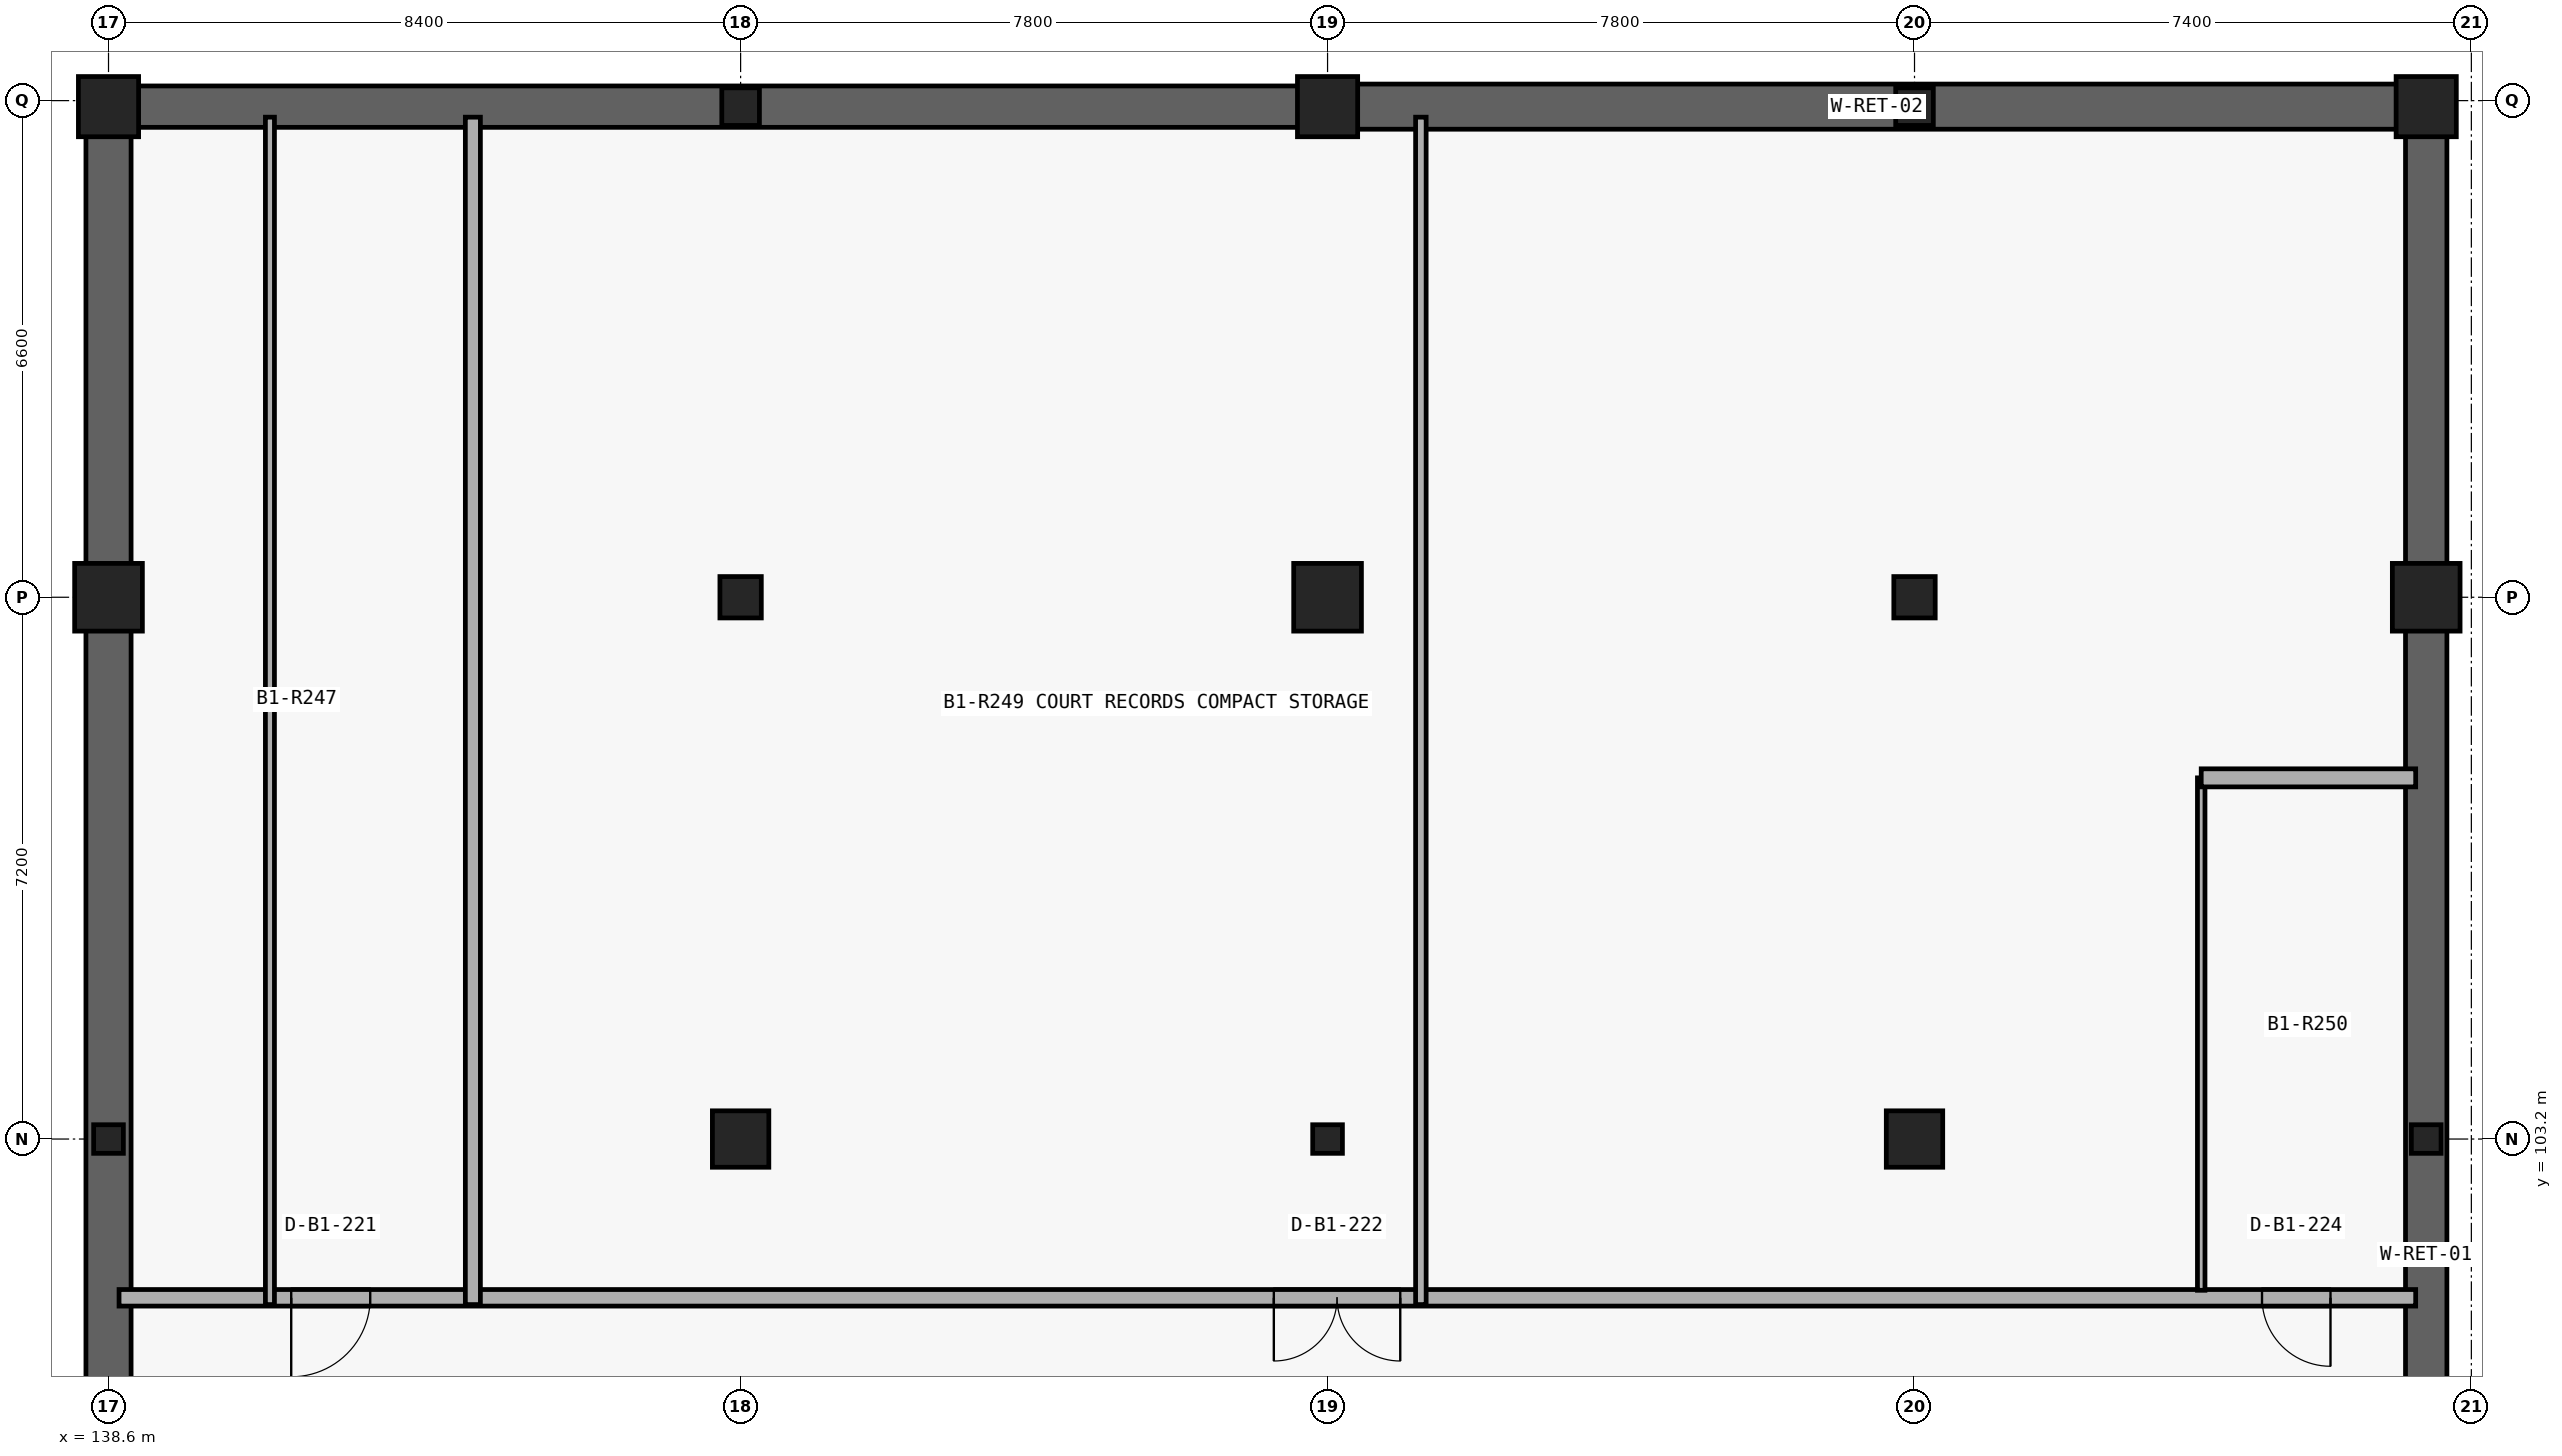
"""IFC4 building model, lengths in metres.
Left out: names, types, materials, properties, quantities, classifications, styles, units other than length and angle.
Written with IfcOpenShell. Run it as: python <this file> out.ifc"""

import sys

from ifc_helpers import new_model, si_unit, direction, frame, frame_2d, origin_with_axes, origin_2d_with_axis, place, context, subcontext, project, spatial, rectangle, i_section, extrude, element, fill, save


model = new_model("IFC4")
c1 = context("Model", 3, precision=1e-05, world=origin_with_axes(), true_north=direction((0.0, 1.0)))
c2 = subcontext(c1, "Body", "Model", "MODEL_VIEW")
j1 = project(units=[si_unit("LENGTHUNIT", "METRE"), si_unit("PLANEANGLEUNIT", "RADIAN")], contexts=[c1])
p1 = place(None, origin_with_axes())
s1 = spatial("IfcSite", under=j1, at=p1, CompositionType="ELEMENT")
p2 = place(p1, origin_with_axes())
s2 = spatial("IfcBuilding", under=s1, at=p2, CompositionType="ELEMENT")
p3 = place(p2, frame((0.0, 0.0, -4.8), z_axis=(0.0, 0.0, 1.0), x_axis=(1.0, 0.0, 0.0)))
s3 = spatial("IfcBuildingStorey", under=s2, at=p3, CompositionType="ELEMENT", Elevation=-4.8)
p4 = place(None, frame((169.4, 86.68, -5.35), z_axis=(0.0, 0.0, 1.0), x_axis=(0.0, 1.0, 0.0)))
e1 = element("IfcWall", 1, at=p4, inside=s3, PredefinedType="USERDEFINED", context=c2, shape_type="SweptSolid", body=[
    extrude(rectangle(XDim=29.96, YDim=0.55, at=frame_2d((14.98, 0.0), x_axis=(1.0, 0.0))), origin_with_axes(), (0.0, 0.0, 1.0), 5.01),
])
p5 = place(None, frame((169.4, 116.92, -5.35), z_axis=(0.0, 0.0, 1.0), x_axis=(-1.0, 0.0, 0.0)))
e2 = element("IfcWall", 2, at=p5, inside=s3, PredefinedType="USERDEFINED", context=c2, shape_type="SweptSolid", body=[
    extrude(rectangle(XDim=14.6, YDim=0.6, at=frame_2d((7.3, 0.0), x_axis=(1.0, 0.0))), origin_with_axes(), (0.0, 0.0, 1.0), 5.01),
])
p6 = place(None, frame((154.8, 116.92, -5.35), z_axis=(0.0, 0.0, 1.0), x_axis=(-1.0, 0.0, 0.0)))
e3 = element("IfcWall", 3, at=p6, inside=s3, PredefinedType="USERDEFINED", context=c2, shape_type="SweptSolid", body=[
    extrude(rectangle(XDim=16.2, YDim=0.55, at=frame_2d((8.1, 0.0), x_axis=(1.0, 0.0))), origin_with_axes(), (0.0, 0.0, 1.0), 5.01),
])
p7 = place(None, frame((138.6, 116.64, -5.35), z_axis=(0.0, 0.0, 1.0), x_axis=(0.0, -1.0, 0.0)))
e4 = element("IfcWall", 4, at=p7, inside=s3, PredefinedType="USERDEFINED", context=c2, shape_type="SweptSolid", body=[
    extrude(rectangle(XDim=29.96, YDim=0.6, at=frame_2d((14.98, 0.0), x_axis=(1.0, 0.0))), origin_with_axes(), (0.0, 0.0, 1.0), 5.01),
])
p8 = place(None, frame((138.74, 101.09, -4.8), z_axis=(0.0, 0.0, 1.0), x_axis=(1.0, 0.0, 0.0)))
e5 = element("IfcWall", 5, at=p8, inside=s3, PredefinedType="PARTITIONING", context=c2, shape_type="SweptSolid", body=[
    extrude(rectangle(XDim=30.52, YDim=0.22, at=frame_2d((15.26, 0.0), x_axis=(1.0, 0.0))), origin_with_axes(), (0.0, 0.0, 1.0), 4.44),
])
p9 = place(None, frame((141.553, 101.09, -4.8), z_axis=(0.0, 0.0, 1.0), x_axis=(1.0, 0.0, 0.0)))
e6 = element("IfcOpeningElement", 6, at=p9, cuts=e5, PredefinedType="OPENING", context=c2, shape_type="SweptSolid", body=[
    extrude(rectangle(XDim=1.05, YDim=2.15, at=frame_2d((0.0, 1.075), x_axis=(1.0, 0.0))), frame((0.0, 0.12, 0.0), z_axis=(0.0, -1.0, 0.0), x_axis=(1.0, 0.0, 0.0)), (0.0, 0.0, 1.0), 0.24),
])
p10 = place(None, frame((154.926, 101.09, -4.8), z_axis=(0.0, 0.0, 1.0), x_axis=(1.0, 0.0, 0.0)))
e7 = element("IfcOpeningElement", 7, at=p10, cuts=e5, PredefinedType="OPENING", context=c2, shape_type="SweptSolid", body=[
    extrude(rectangle(XDim=1.68, YDim=2.22, at=frame_2d((0.0, 1.11), x_axis=(1.0, 0.0))), frame((0.0, 0.12, 0.0), z_axis=(0.0, -1.0, 0.0), x_axis=(1.0, 0.0, 0.0)), (0.0, 0.0, 1.0), 0.24),
])
p11 = place(None, frame((167.673, 101.09, -4.8), z_axis=(0.0, 0.0, 1.0), x_axis=(1.0, 0.0, 0.0)))
e8 = element("IfcOpeningElement", 8, at=p11, cuts=e5, PredefinedType="OPENING", context=c2, shape_type="SweptSolid", body=[
    extrude(rectangle(XDim=0.91, YDim=2.12, at=frame_2d((0.0, 1.06), x_axis=(1.0, 0.0))), frame((0.0, 0.12, 0.0), z_axis=(0.0, -1.0, 0.0), x_axis=(1.0, 0.0, 0.0)), (0.0, 0.0, 1.0), 0.24),
])
p12 = place(None, frame((166.41, 101.19, -4.8), z_axis=(0.0, 0.0, 1.0), x_axis=(0.0, 1.0, 0.0)))
e9 = element("IfcWall", 9, at=p12, inside=s3, PredefinedType="PARTITIONING", context=c2, shape_type="SweptSolid", body=[
    extrude(rectangle(XDim=6.81, YDim=0.1, at=frame_2d((3.405, 0.0), x_axis=(1.0, 0.0))), origin_with_axes(), (0.0, 0.0, 1.0), 4.44),
])
p13 = place(None, frame((166.41, 108.0, -4.8), z_axis=(0.0, 0.0, 1.0), x_axis=(1.0, 0.0, 0.0)))
e10 = element("IfcWall", 10, at=p13, inside=s3, PredefinedType="PLUMBINGWALL", context=c2, shape_type="SweptSolid", body=[
    extrude(rectangle(XDim=2.85, YDim=0.24, at=frame_2d((1.425, 0.0), x_axis=(1.0, 0.0))), origin_with_axes(), (0.0, 0.0, 1.0), 4.152),
])
p14 = place(None, frame((140.745, 101.0, -4.8), z_axis=(0.0, 0.0, 1.0), x_axis=(0.0, 1.0, 0.0)))
e11 = element("IfcWall", 11, at=p14, inside=s3, PredefinedType="PARTITIONING", context=c2, shape_type="SweptSolid", body=[
    extrude(rectangle(XDim=15.78, YDim=0.12, at=frame_2d((7.89, 0.0), x_axis=(1.0, 0.0))), origin_with_axes(), (0.0, 0.0, 1.0), 4.44),
])
p15 = place(None, frame((143.442, 101.0, -4.8), z_axis=(0.0, 0.0, 1.0), x_axis=(0.0, 1.0, 0.0)))
e12 = element("IfcWall", 12, at=p15, inside=s3, PredefinedType="PARTITIONING", context=c2, shape_type="SweptSolid", body=[
    extrude(rectangle(XDim=15.78, YDim=0.2, at=frame_2d((7.89, 0.0), x_axis=(1.0, 0.0))), origin_with_axes(), (0.0, 0.0, 1.0), 4.44),
])
p16 = place(None, frame((156.04, 101.0, -4.8), z_axis=(0.0, 0.0, 1.0), x_axis=(0.0, 1.0, 0.0)))
e13 = element("IfcWall", 13, at=p16, inside=s3, PredefinedType="PARTITIONING", context=c2, shape_type="SweptSolid", body=[
    extrude(rectangle(XDim=15.78, YDim=0.14, at=frame_2d((7.89, 0.0), x_axis=(1.0, 0.0))), origin_with_axes(), (0.0, 0.0, 1.0), 4.44),
])
p17 = place(None, frame((138.6, 103.2, -5.35), z_axis=(0.0, 0.0, 1.0), x_axis=(1.0, 0.0, 0.0)))
e14 = element("IfcColumn", 14, at=p17, inside=s3, PredefinedType="COLUMN", context=c2, shape_type="SweptSolid", body=[
    extrude(i_section(OverallWidth=0.395, OverallDepth=0.38, WebThickness=0.019, FlangeThickness=0.03, at=origin_2d_with_axis()), origin_with_axes(), (0.0, 0.0, 1.0), 5.35),
])
p18 = place(None, frame((138.6, 110.4, -5.35), z_axis=(0.0, 0.0, 1.0), x_axis=(1.0, 0.0, 0.0)))
e15 = element("IfcColumn", 15, at=p18, inside=s3, PredefinedType="COLUMN", context=c2, shape_type="SweptSolid", body=[
    extrude(rectangle(XDim=0.9, YDim=0.9, at=origin_2d_with_axis()), origin_with_axes(), (0.0, 0.0, 1.0), 5.35),
])
p19 = place(None, frame((138.6, 116.92, -5.35), z_axis=(0.0, 0.0, 1.0), x_axis=(1.0, 0.0, 0.0)))
e16 = element("IfcColumn", 16, at=p19, inside=s3, PredefinedType="COLUMN", context=c2, shape_type="SweptSolid", body=[
    extrude(rectangle(XDim=0.8, YDim=0.8, at=origin_2d_with_axis()), origin_with_axes(), (0.0, 0.0, 1.0), 5.35),
])
p20 = place(None, frame((147.0, 103.2, -5.35), z_axis=(0.0, 0.0, 1.0), x_axis=(1.0, 0.0, 0.0)))
e17 = element("IfcColumn", 17, at=p20, inside=s3, PredefinedType="COLUMN", context=c2, shape_type="SweptSolid", body=[
    extrude(rectangle(XDim=0.75, YDim=0.75, at=origin_2d_with_axis()), origin_with_axes(), (0.0, 0.0, 1.0), 5.35),
])
p21 = place(None, frame((147.0, 110.4, -5.35), z_axis=(0.0, 0.0, 1.0), x_axis=(1.0, 0.0, 0.0)))
e18 = element("IfcColumn", 18, at=p21, inside=s3, PredefinedType="COLUMN", context=c2, shape_type="SweptSolid", body=[
    extrude(i_section(OverallWidth=0.55, OverallDepth=0.55, WebThickness=0.025, FlangeThickness=0.042, at=origin_2d_with_axis()), origin_with_axes(), (0.0, 0.0, 1.0), 5.35),
])
p22 = place(None, frame((147.0, 116.92, -5.35), z_axis=(0.0, 0.0, 1.0), x_axis=(1.0, 0.0, 0.0)))
e19 = element("IfcColumn", 19, at=p22, inside=s3, PredefinedType="COLUMN", context=c2, shape_type="SweptSolid", body=[
    extrude(i_section(OverallWidth=0.5, OverallDepth=0.5, WebThickness=0.022, FlangeThickness=0.036, at=origin_2d_with_axis()), origin_with_axes(), (0.0, 0.0, 1.0), 5.35),
])
p23 = place(None, frame((154.8, 103.2, -5.35), z_axis=(0.0, 0.0, 1.0), x_axis=(1.0, 0.0, 0.0)))
e20 = element("IfcColumn", 20, at=p23, inside=s3, PredefinedType="COLUMN", context=c2, shape_type="SweptSolid", body=[
    extrude(i_section(OverallWidth=0.395, OverallDepth=0.38, WebThickness=0.019, FlangeThickness=0.03, at=origin_2d_with_axis()), origin_with_axes(), (0.0, 0.0, 1.0), 5.35),
])
p24 = place(None, frame((154.8, 110.4, -5.35), z_axis=(0.0, 0.0, 1.0), x_axis=(1.0, 0.0, 0.0)))
e21 = element("IfcColumn", 21, at=p24, inside=s3, PredefinedType="COLUMN", context=c2, shape_type="SweptSolid", body=[
    extrude(rectangle(XDim=0.9, YDim=0.9, at=origin_2d_with_axis()), origin_with_axes(), (0.0, 0.0, 1.0), 5.35),
])
p25 = place(None, frame((154.8, 116.92, -5.35), z_axis=(0.0, 0.0, 1.0), x_axis=(1.0, 0.0, 0.0)))
e22 = element("IfcColumn", 22, at=p25, inside=s3, PredefinedType="COLUMN", context=c2, shape_type="SweptSolid", body=[
    extrude(rectangle(XDim=0.8, YDim=0.8, at=origin_2d_with_axis()), origin_with_axes(), (0.0, 0.0, 1.0), 5.35),
])
p26 = place(None, frame((162.6, 103.2, -5.35), z_axis=(0.0, 0.0, 1.0), x_axis=(1.0, 0.0, 0.0)))
e23 = element("IfcColumn", 23, at=p26, inside=s3, PredefinedType="COLUMN", context=c2, shape_type="SweptSolid", body=[
    extrude(rectangle(XDim=0.75, YDim=0.75, at=origin_2d_with_axis()), origin_with_axes(), (0.0, 0.0, 1.0), 5.35),
])
p27 = place(None, frame((162.6, 110.4, -5.35), z_axis=(0.0, 0.0, 1.0), x_axis=(1.0, 0.0, 0.0)))
e24 = element("IfcColumn", 24, at=p27, inside=s3, PredefinedType="COLUMN", context=c2, shape_type="SweptSolid", body=[
    extrude(i_section(OverallWidth=0.55, OverallDepth=0.55, WebThickness=0.025, FlangeThickness=0.042, at=origin_2d_with_axis()), origin_with_axes(), (0.0, 0.0, 1.0), 5.35),
])
p28 = place(None, frame((162.6, 116.92, -5.35), z_axis=(0.0, 0.0, 1.0), x_axis=(1.0, 0.0, 0.0)))
e25 = element("IfcColumn", 25, at=p28, inside=s3, PredefinedType="COLUMN", context=c2, shape_type="SweptSolid", body=[
    extrude(i_section(OverallWidth=0.5, OverallDepth=0.5, WebThickness=0.022, FlangeThickness=0.036, at=origin_2d_with_axis()), origin_with_axes(), (0.0, 0.0, 1.0), 5.35),
])
p29 = place(None, frame((169.4, 103.2, -5.35), z_axis=(0.0, 0.0, 1.0), x_axis=(1.0, 0.0, 0.0)))
e26 = element("IfcColumn", 26, at=p29, inside=s3, PredefinedType="COLUMN", context=c2, shape_type="SweptSolid", body=[
    extrude(i_section(OverallWidth=0.395, OverallDepth=0.38, WebThickness=0.019, FlangeThickness=0.03, at=origin_2d_with_axis()), origin_with_axes(), (0.0, 0.0, 1.0), 5.35),
])
p30 = place(None, frame((169.4, 110.4, -5.35), z_axis=(0.0, 0.0, 1.0), x_axis=(1.0, 0.0, 0.0)))
e27 = element("IfcColumn", 27, at=p30, inside=s3, PredefinedType="COLUMN", context=c2, shape_type="SweptSolid", body=[
    extrude(rectangle(XDim=0.9, YDim=0.9, at=origin_2d_with_axis()), origin_with_axes(), (0.0, 0.0, 1.0), 5.35),
])
p31 = place(None, frame((169.4, 116.92, -5.35), z_axis=(0.0, 0.0, 1.0), x_axis=(1.0, 0.0, 0.0)))
e28 = element("IfcColumn", 28, at=p31, inside=s3, PredefinedType="COLUMN", context=c2, shape_type="SweptSolid", body=[
    extrude(rectangle(XDim=0.8, YDim=0.8, at=origin_2d_with_axis()), origin_with_axes(), (0.0, 0.0, 1.0), 5.35),
])
p32 = place(None, frame((141.553, 101.09, -4.8), z_axis=(0.0, 0.0, 1.0), x_axis=(-1.0, 0.0, 0.0)))
e29 = element("IfcDoor", 29, at=p32, inside=s3, OperationType="SINGLE_SWING_LEFT", PredefinedType="DOOR", context=c2, shape_type="SweptSolid", body=[
    extrude(rectangle(XDim=1.05, YDim=2.15, at=frame_2d((0.0, 1.075), x_axis=(1.0, 0.0))), frame((0.0, 0.04, 0.0), z_axis=(0.0, -1.0, 0.0), x_axis=(1.0, 0.0, 0.0)), (0.0, 0.0, 1.0), 0.08),
])
fill(e6, e29)
p33 = place(None, frame((154.926, 101.09, -4.8), z_axis=(0.0, 0.0, 1.0), x_axis=(-1.0, 0.0, 0.0)))
e30 = element("IfcDoor", 30, at=p33, inside=s3, OperationType="DOUBLE_DOOR_SINGLE_SWING", PredefinedType="DOOR", context=c2, shape_type="SweptSolid", body=[
    extrude(rectangle(XDim=1.68, YDim=2.22, at=frame_2d((0.0, 1.11), x_axis=(1.0, 0.0))), frame((0.0, 0.04, 0.0), z_axis=(0.0, -1.0, 0.0), x_axis=(1.0, 0.0, 0.0)), (0.0, 0.0, 1.0), 0.08),
])
fill(e7, e30)
p34 = place(None, frame((167.673, 101.09, -4.8), z_axis=(0.0, 0.0, 1.0), x_axis=(-1.0, 0.0, 0.0)))
e31 = element("IfcDoor", 31, at=p34, inside=s3, OperationType="SINGLE_SWING_RIGHT", PredefinedType="DOOR", context=c2, shape_type="SweptSolid", body=[
    extrude(rectangle(XDim=0.91, YDim=2.12, at=frame_2d((0.0, 1.06), x_axis=(1.0, 0.0))), frame((0.0, 0.04, 0.0), z_axis=(0.0, -1.0, 0.0), x_axis=(1.0, 0.0, 0.0)), (0.0, 0.0, 1.0), 0.08),
])
fill(e8, e31)
save(model, sys.argv[1])
